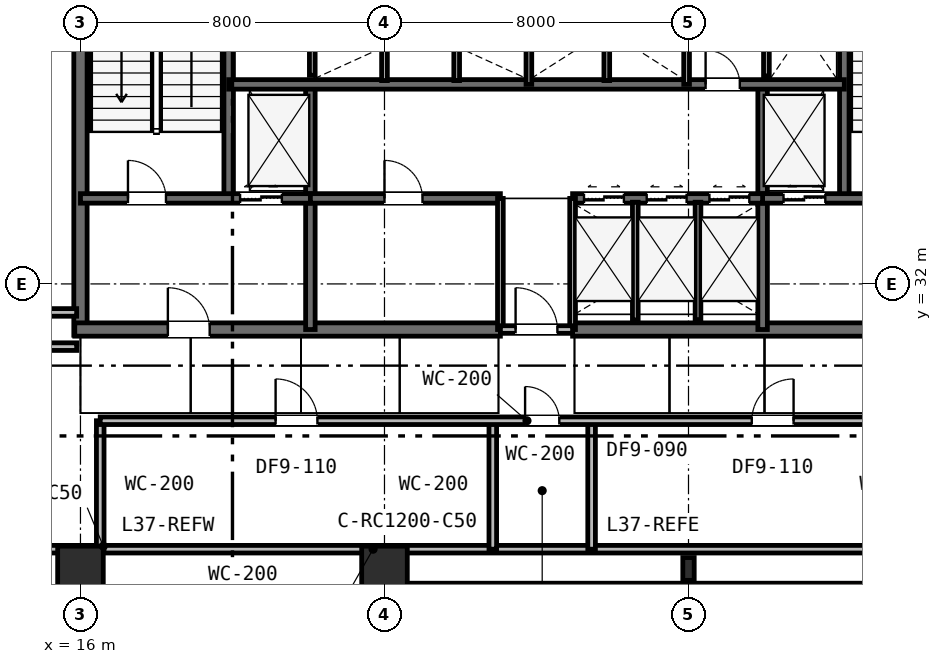
"""IFC4 building model, lengths in metres.
Left out: names, types, materials, properties, quantities, classifications, styles, units other than length and angle.
Written with IfcOpenShell. Run it as: python <this file> out.ifc"""

import sys

from ifc_helpers import new_model, si_unit, direction, frame, frame_2d, origin, origin_2d, place, context, subcontext, project, spatial, rectangle, i_section, extrude, element, fill, save


model = new_model("IFC4")
c1 = context("Model", 3, precision=1e-05, world=origin(), true_north=direction((0.0, 1.0)))
c2 = subcontext(c1, "Body", "Model", "MODEL_VIEW")
j1 = project(units=[si_unit("LENGTHUNIT", "METRE"), si_unit("PLANEANGLEUNIT", "RADIAN")], contexts=[c1])
p1 = place(None, origin())
s1 = spatial("IfcSite", under=j1, at=p1, CompositionType="ELEMENT")
p2 = place(p1, origin())
s2 = spatial("IfcBuilding", under=s1, at=p2, CompositionType="ELEMENT")
p3 = place(p2, frame((0.0, 0.0, 144.0)))
s3 = spatial("IfcBuildingStorey", under=s2, at=p3, CompositionType="ELEMENT", Elevation=144.0)
p4 = place(p3, frame((16.0, 30.65, 0.0), z_axis=(0.0, 0.0, 1.0), x_axis=(0.0, 1.0, 0.0)))
e1 = element("IfcWall", 1, at=p4, inside=s3, PredefinedType="SHEAR", context=c2, shape_type="SweptSolid", body=[
    extrude(rectangle(XDim=12.3, YDim=0.35, at=frame_2d((6.15, 0.0))), origin(), (0.0, 0.0, 1.0), 4.8),
])
p5 = place(p3, frame((15.85, 30.8, 0.0), z_axis=(0.0, 0.0, 1.0), x_axis=(1.0, 0.0, 0.0)))
e2 = element("IfcWall", 2, at=p5, inside=s3, PredefinedType="SHEAR", context=c2, shape_type="SweptSolid", body=[
    extrude(rectangle(XDim=11.2, YDim=0.35, at=frame_2d((5.6, 0.0))), origin(), (0.0, 0.0, 1.0), 4.8),
])
p6 = place(p5, frame((2.45, 0.0, 0.0)))
e3 = element("IfcOpeningElement", 3, at=p6, cuts=e2, PredefinedType="OPENING", context=c2, shape_type="SweptSolid", body=[
    extrude(rectangle(XDim=1.1, YDim=2.15, at=frame_2d((0.55, 1.075))), frame((0.0, 0.185, 0.0), z_axis=(0.0, -1.0, 0.0), x_axis=(1.0, 0.0, 0.0)), (0.0, 0.0, 1.0), 0.37),
])
p7 = place(p3, frame((28.95, 30.8, 0.0), z_axis=(0.0, 0.0, 1.0), x_axis=(1.0, 0.0, 0.0)))
e4 = element("IfcWall", 4, at=p7, inside=s3, PredefinedType="SHEAR", context=c2, shape_type="SweptSolid", body=[
    extrude(rectangle(XDim=11.2, YDim=0.35, at=frame_2d((5.6, 0.0))), origin(), (0.0, 0.0, 1.0), 4.8),
])
p8 = place(p7, frame((7.65, 0.0, 0.0)))
e5 = element("IfcOpeningElement", 5, at=p8, cuts=e4, PredefinedType="OPENING", context=c2, shape_type="SweptSolid", body=[
    extrude(rectangle(XDim=1.1, YDim=2.15, at=frame_2d((0.55, 1.075))), frame((0.0, 0.185, 0.0), z_axis=(0.0, -1.0, 0.0), x_axis=(1.0, 0.0, 0.0)), (0.0, 0.0, 1.0), 0.37),
])
for number, where, z_axis, x_axis in (
    (6, (19.9, 34.25, 0.0), (0.0, 0.0, 1.0), (0.0, 1.0, 0.0)),
    (7, (36.1, 34.25, 0.0), (0.0, 0.0, 1.0), (0.0, 1.0, 0.0)),
):
    element("IfcWall", number, at=place(p3, frame(where, z_axis=z_axis, x_axis=x_axis)), inside=s3, PredefinedType="SHEAR", context=c2, shape_type="SweptSolid", body=[
        extrude(rectangle(XDim=8.65, YDim=0.25, at=frame_2d((4.325, 0.0))), origin(), (0.0, 0.0, 1.0), 4.8),
    ])
for number, where, z_axis, x_axis in (
    (8, (22.05, 30.8, 0.0), (0.0, 0.0, 1.0), (0.0, 1.0, 0.0)),
    (9, (33.95, 30.8, 0.0), (0.0, 0.0, 1.0), (0.0, 1.0, 0.0)),
):
    element("IfcWall", number, at=place(p3, frame(where, z_axis=z_axis, x_axis=x_axis)), inside=s3, PredefinedType="SHEAR", context=c2, shape_type="SweptSolid", body=[
        extrude(rectangle(XDim=6.45, YDim=0.25, at=frame_2d((3.225, 0.0))), origin(), (0.0, 0.0, 1.0), 4.8),
    ])
p9 = place(p3, frame((16.0, 34.25, 0.0), z_axis=(0.0, 0.0, 1.0), x_axis=(1.0, 0.0, 0.0)))
e10 = element("IfcWall", 10, at=p9, inside=s3, PredefinedType="SHEAR", context=c2, shape_type="SweptSolid", body=[
    extrude(rectangle(XDim=6.05, YDim=0.25, at=frame_2d((3.025, 0.0))), origin(), (0.0, 0.0, 1.0), 4.8),
])
p10 = place(p9, frame((1.25, 0.0, 0.0)))
e11 = element("IfcOpeningElement", 11, at=p10, cuts=e10, PredefinedType="OPENING", context=c2, shape_type="SweptSolid", body=[
    extrude(rectangle(XDim=1.0, YDim=2.15, at=frame_2d((0.5, 1.075))), frame((0.0, 0.135, 0.0), z_axis=(0.0, -1.0, 0.0), x_axis=(1.0, 0.0, 0.0)), (0.0, 0.0, 1.0), 0.27),
])
p11 = place(p9, frame((4.2, 0.0, 0.0)))
e12 = element("IfcOpeningElement", 12, at=p11, cuts=e10, PredefinedType="OPENING", context=c2, shape_type="SweptSolid", body=[
    extrude(rectangle(XDim=1.1, YDim=2.15, at=frame_2d((0.55, 1.075))), frame((0.0, 0.135, 0.0), z_axis=(0.0, -1.0, 0.0), x_axis=(1.0, 0.0, 0.0)), (0.0, 0.0, 1.0), 0.27),
])
p12 = place(p3, frame((33.95, 34.25, 0.0), z_axis=(0.0, 0.0, 1.0), x_axis=(1.0, 0.0, 0.0)))
e13 = element("IfcWall", 13, at=p12, inside=s3, PredefinedType="SHEAR", context=c2, shape_type="SweptSolid", body=[
    extrude(rectangle(XDim=6.05, YDim=0.25, at=frame_2d((3.025, 0.0))), origin(), (0.0, 0.0, 1.0), 4.8),
])
p13 = place(p12, frame((3.7, 0.0, 0.0)))
e14 = element("IfcOpeningElement", 14, at=p13, cuts=e13, PredefinedType="OPENING", context=c2, shape_type="SweptSolid", body=[
    extrude(rectangle(XDim=1.0, YDim=2.15, at=frame_2d((0.5, 1.075))), frame((0.0, 0.135, 0.0), z_axis=(0.0, -1.0, 0.0), x_axis=(1.0, 0.0, 0.0)), (0.0, 0.0, 1.0), 0.27),
])
p14 = place(p12, frame((0.55, 0.0, 0.0)))
e15 = element("IfcOpeningElement", 15, at=p14, cuts=e13, PredefinedType="OPENING", context=c2, shape_type="SweptSolid", body=[
    extrude(rectangle(XDim=1.1, YDim=2.15, at=frame_2d((0.55, 1.075))), frame((0.0, 0.135, 0.0), z_axis=(0.0, -1.0, 0.0), x_axis=(1.0, 0.0, 0.0)), (0.0, 0.0, 1.0), 0.27),
])
p15 = place(p3, frame((22.05, 34.25, 0.0), z_axis=(0.0, 0.0, 1.0), x_axis=(1.0, 0.0, 0.0)))
e16 = element("IfcWall", 16, at=p15, inside=s3, PredefinedType="SHEAR", context=c2, shape_type="SweptSolid", body=[
    extrude(rectangle(XDim=5.0, YDim=0.25, at=frame_2d((2.5, 0.0))), origin(), (0.0, 0.0, 1.0), 4.8),
])
p16 = place(p15, frame((1.95, 0.0, 0.0)))
e17 = element("IfcOpeningElement", 17, at=p16, cuts=e16, PredefinedType="OPENING", context=c2, shape_type="SweptSolid", body=[
    extrude(rectangle(XDim=1.0, YDim=2.15, at=frame_2d((0.5, 1.075))), frame((0.0, 0.135, 0.0), z_axis=(0.0, -1.0, 0.0), x_axis=(1.0, 0.0, 0.0)), (0.0, 0.0, 1.0), 0.27),
])
p17 = place(p3, frame((28.95, 34.25, 0.0), z_axis=(0.0, 0.0, 1.0), x_axis=(1.0, 0.0, 0.0)))
e18 = element("IfcWall", 18, at=p17, inside=s3, PredefinedType="SHEAR", context=c2, shape_type="SweptSolid", body=[
    extrude(rectangle(XDim=5.0, YDim=0.25, at=frame_2d((2.5, 0.0))), origin(), (0.0, 0.0, 1.0), 4.8),
])
p18 = place(p17, frame((0.3, 0.0, 0.0)))
e19 = element("IfcOpeningElement", 19, at=p18, cuts=e18, PredefinedType="OPENING", context=c2, shape_type="SweptSolid", body=[
    extrude(rectangle(XDim=1.05, YDim=2.15, at=frame_2d((0.525, 1.075))), frame((0.0, 0.135, 0.0), z_axis=(0.0, -1.0, 0.0), x_axis=(1.0, 0.0, 0.0)), (0.0, 0.0, 1.0), 0.27),
])
p19 = place(p17, frame((1.95, 0.0, 0.0)))
e20 = element("IfcOpeningElement", 20, at=p19, cuts=e18, PredefinedType="OPENING", context=c2, shape_type="SweptSolid", body=[
    extrude(rectangle(XDim=1.05, YDim=2.15, at=frame_2d((0.525, 1.075))), frame((0.0, 0.135, 0.0), z_axis=(0.0, -1.0, 0.0), x_axis=(1.0, 0.0, 0.0)), (0.0, 0.0, 1.0), 0.27),
])
p20 = place(p17, frame((3.6, 0.0, 0.0)))
e21 = element("IfcOpeningElement", 21, at=p20, cuts=e18, PredefinedType="OPENING", context=c2, shape_type="SweptSolid", body=[
    extrude(rectangle(XDim=1.05, YDim=2.15, at=frame_2d((0.525, 1.075))), frame((0.0, 0.135, 0.0), z_axis=(0.0, -1.0, 0.0), x_axis=(1.0, 0.0, 0.0)), (0.0, 0.0, 1.0), 0.27),
])
p21 = place(p3, frame((19.9, 37.25, 0.0), z_axis=(0.0, 0.0, 1.0), x_axis=(1.0, 0.0, 0.0)))
e22 = element("IfcWall", 22, at=p21, inside=s3, PredefinedType="SHEAR", context=c2, shape_type="SweptSolid", body=[
    extrude(rectangle(XDim=16.2, YDim=0.25, at=frame_2d((8.1, 0.0))), origin(), (0.0, 0.0, 1.0), 4.8),
])
p22 = place(p21, frame((12.55, 0.0, 0.0)))
e23 = element("IfcOpeningElement", 23, at=p22, cuts=e22, PredefinedType="OPENING", context=c2, shape_type="SweptSolid", body=[
    extrude(rectangle(XDim=0.9, YDim=2.15, at=frame_2d((0.45, 1.075))), frame((0.0, 0.135, 0.0), z_axis=(0.0, -1.0, 0.0), x_axis=(1.0, 0.0, 0.0)), (0.0, 0.0, 1.0), 0.27),
])
for number, where, z_axis, x_axis in (
    (24, (16.0, 24.5, 0.0), (0.0, 0.0, 1.0), (1.0, 0.0, 0.0)),
    (25, (24.0, 24.5, 0.0), (0.0, 0.0, 1.0), (1.0, 0.0, 0.0)),
):
    element("IfcColumn", number, at=place(p3, frame(where, z_axis=z_axis, x_axis=x_axis)), inside=s3, PredefinedType="COLUMN", context=c2, shape_type="SweptSolid", body=[
        extrude(rectangle(XDim=1.2, YDim=1.2, at=origin_2d()), origin(), (0.0, 0.0, 1.0), 4.8),
    ])
p23 = place(p3, frame((32.0, 24.5, 0.0), z_axis=(0.0, 0.0, 1.0), x_axis=(1.0, 0.0, 0.0)))
e26 = element("IfcColumn", 26, at=p23, inside=s3, PredefinedType="COLUMN", context=c2, shape_type="SweptSolid", body=[
    extrude(i_section(OverallWidth=0.3, OverallDepth=0.6, WebThickness=0.015, FlangeThickness=0.03, FilletRadius=0.027, at=origin_2d()), origin(), (0.0, 0.0, 1.0), 4.8),
])
p24 = place(p3, frame((24.6, 24.0, 0.0), z_axis=(0.0, 0.0, 1.0), x_axis=(1.0, 0.0, 0.0)))
e27 = element("IfcWall", 27, at=p24, inside=s3, PredefinedType="STANDARD", context=c2, shape_type="SweptSolid", body=[
    extrude(rectangle(XDim=14.3, YDim=0.25, at=frame_2d((7.15, 0.0))), origin(), (0.0, 0.0, 1.0), 1.15),
])
for number, where, z_axis, x_axis in (
    (28, (27.05, 30.8, 0.0), (0.0, 0.0, 1.0), (0.0, 1.0, 0.0)),
    (29, (28.95, 30.8, 0.0), (0.0, 0.0, 1.0), (0.0, 1.0, 0.0)),
):
    element("IfcWall", number, at=place(p3, frame(where, z_axis=z_axis, x_axis=x_axis)), inside=s3, PredefinedType="PLUMBINGWALL", context=c2, shape_type="SweptSolid", body=[
        extrude(rectangle(XDim=3.45, YDim=0.15, at=frame_2d((1.725, 0.0))), origin(), (0.0, 0.0, 1.0), 4.02),
    ])
p25 = place(p3, frame((27.05, 30.8, 0.0), z_axis=(0.0, 0.0, 1.0), x_axis=(1.0, 0.0, 0.0)))
e30 = element("IfcWall", 30, at=p25, inside=s3, PredefinedType="PARTITIONING", context=c2, shape_type="SweptSolid", body=[
    extrude(rectangle(XDim=1.9, YDim=0.2, at=frame_2d((0.95, 0.0))), origin(), (0.0, 0.0, 1.0), 4.02),
])
p26 = place(p25, frame((0.4, 0.0, 0.0)))
e31 = element("IfcOpeningElement", 31, at=p26, cuts=e30, PredefinedType="OPENING", context=c2, shape_type="SweptSolid", body=[
    extrude(rectangle(XDim=1.1, YDim=2.15, at=frame_2d((0.55, 1.075))), frame((0.0, 0.11, 0.0), z_axis=(0.0, -1.0, 0.0), x_axis=(1.0, 0.0, 0.0)), (0.0, 0.0, 1.0), 0.22),
])
for number, where, z_axis, x_axis in (
    (32, (30.6, 31.05, 0.0), (0.0, 0.0, 1.0), (0.0, 1.0, 0.0)),
    (33, (32.25, 31.05, 0.0), (0.0, 0.0, 1.0), (0.0, 1.0, 0.0)),
):
    element("IfcWall", number, at=place(p3, frame(where, z_axis=z_axis, x_axis=x_axis)), inside=s3, PredefinedType="PLUMBINGWALL", context=c2, shape_type="SweptSolid", body=[
        extrude(rectangle(XDim=3.1, YDim=0.15, at=frame_2d((1.55, 0.0))), origin(), (0.0, 0.0, 1.0), 4.02),
    ])
p27 = place(p3, frame((22.1, 37.49, 0.0), z_axis=(0.0, 0.0, 1.0), x_axis=(0.0, 1.0, 0.0)))
e34 = element("IfcWall", 34, at=p27, inside=s3, PredefinedType="PLUMBINGWALL", context=c2, shape_type="SweptSolid", body=[
    extrude(rectangle(XDim=2.56, YDim=0.15, at=frame_2d((1.28, 0.0))), origin(), (0.0, 0.0, 1.0), 4.02),
])
p28 = place(p3, frame((27.8, 37.25, 0.0), z_axis=(0.0, 0.0, 1.0), x_axis=(0.0, 1.0, 0.0)))
e35 = element("IfcWall", 35, at=p28, inside=s3, PredefinedType="PLUMBINGWALL", context=c2, shape_type="SweptSolid", body=[
    extrude(rectangle(XDim=2.8, YDim=0.15, at=frame_2d((1.4, 0.0))), origin(), (0.0, 0.0, 1.0), 4.02),
])
for number, where, z_axis, x_axis in (
    (36, (24.0, 37.35, 0.0), (0.0, 0.0, 1.0), (0.0, 1.0, 0.0)),
    (37, (25.9, 37.35, 0.0), (0.0, 0.0, 1.0), (0.0, 1.0, 0.0)),
):
    element("IfcWall", number, at=place(p3, frame(where, z_axis=z_axis, x_axis=x_axis)), inside=s3, PredefinedType="PLUMBINGWALL", context=c2, shape_type="SweptSolid", body=[
        extrude(rectangle(XDim=2.6, YDim=0.15, at=frame_2d((1.3, 0.0))), origin(), (0.0, 0.0, 1.0), 4.02),
    ])
p29 = place(p3, frame((31.95, 37.25, 0.0), z_axis=(0.0, 0.0, 1.0), x_axis=(0.0, 1.0, 0.0)))
e38 = element("IfcWall", 38, at=p29, inside=s3, PredefinedType="PLUMBINGWALL", context=c2, shape_type="SweptSolid", body=[
    extrude(rectangle(XDim=2.8, YDim=0.15, at=frame_2d((1.4, 0.0))), origin(), (0.0, 0.0, 1.0), 4.02),
])
p30 = place(p3, frame((29.85, 37.35, 0.0), z_axis=(0.0, 0.0, 1.0), x_axis=(0.0, 1.0, 0.0)))
e39 = element("IfcWall", 39, at=p30, inside=s3, PredefinedType="PLUMBINGWALL", context=c2, shape_type="SweptSolid", body=[
    extrude(rectangle(XDim=2.6, YDim=0.15, at=frame_2d((1.3, 0.0))), origin(), (0.0, 0.0, 1.0), 4.02),
])
p31 = place(p3, frame((34.05, 37.473, 0.0), z_axis=(0.0, 0.0, 1.0), x_axis=(0.0, 1.0, 0.0)))
e40 = element("IfcWall", 40, at=p31, inside=s3, PredefinedType="PLUMBINGWALL", context=c2, shape_type="SweptSolid", body=[
    extrude(rectangle(XDim=2.577, YDim=0.15, at=frame_2d((1.288, 0.0))), origin(), (0.0, 0.0, 1.0), 4.02),
])
p32 = place(p3, frame((8.4, 25.02, 0.0), z_axis=(0.0, 0.0, 1.0), x_axis=(1.0, 0.0, 0.0)))
e41 = element("IfcWall", 41, at=p32, inside=s3, PredefinedType="PARTITIONING", context=c2, shape_type="SweptSolid", body=[
    extrude(rectangle(XDim=30.6, YDim=0.2, at=frame_2d((15.3, 0.0))), origin(), (0.0, 0.0, 1.0), 4.02),
])
p33 = place(p3, frame((16.52, 25.02, 0.0), z_axis=(0.0, 0.0, 1.0), x_axis=(0.0, 1.0, 0.0)))
e42 = element("IfcWall", 42, at=p33, inside=s3, PredefinedType="PARTITIONING", context=c2, shape_type="SweptSolid", body=[
    extrude(rectangle(XDim=3.38, YDim=0.2, at=frame_2d((1.69, 0.0))), origin(), (0.0, 0.0, 1.0), 4.02),
])
for number, where, z_axis, x_axis in (
    (43, (0.1, 30.35, 0.0), (0.0, 0.0, 1.0), (1.0, 0.0, 0.0)),
    (44, (0.1, 31.25, 0.0), (0.0, 0.0, 1.0), (1.0, 0.0, 0.0)),
):
    element("IfcWall", number, at=place(p3, frame(where, z_axis=z_axis, x_axis=x_axis)), inside=s3, PredefinedType="PARTITIONING", context=c2, shape_type="SweptSolid", body=[
        extrude(rectangle(XDim=15.8, YDim=0.2, at=frame_2d((7.9, 0.0))), origin(), (0.0, 0.0, 1.0), 4.02),
    ])
for number, where, z_axis, x_axis in (
    (45, (26.85, 25.02, 0.0), (0.0, 0.0, 1.0), (0.0, 1.0, 0.0)),
    (46, (29.45, 25.02, 0.0), (0.0, 0.0, 1.0), (0.0, 1.0, 0.0)),
):
    element("IfcWall", number, at=place(p3, frame(where, z_axis=z_axis, x_axis=x_axis)), inside=s3, PredefinedType="PARTITIONING", context=c2, shape_type="SweptSolid", body=[
        extrude(rectangle(XDim=3.38, YDim=0.2, at=frame_2d((1.69, 0.0))), origin(), (0.0, 0.0, 1.0), 4.02),
    ])
p34 = place(p3, frame((16.52, 28.4, 0.0), z_axis=(0.0, 0.0, 1.0), x_axis=(1.0, 0.0, 0.0)))
e47 = element("IfcWall", 47, at=p34, inside=s3, PredefinedType="PARTITIONING", context=c2, shape_type="SweptSolid", body=[
    extrude(rectangle(XDim=22.46, YDim=0.2, at=frame_2d((11.23, 0.0))), origin(), (0.0, 0.0, 1.0), 4.02),
])
p35 = place(p34, frame((4.615, 0.0, 0.0)))
e48 = element("IfcOpeningElement", 48, at=p35, cuts=e47, PredefinedType="OPENING", context=c2, shape_type="SweptSolid", body=[
    extrude(rectangle(XDim=1.1, YDim=2.15, at=frame_2d((0.55, 1.075))), frame((0.0, 0.11, 0.0), z_axis=(0.0, -1.0, 0.0), x_axis=(1.0, 0.0, 0.0)), (0.0, 0.0, 1.0), 0.22),
])
p36 = place(p34, frame((11.18, 0.0, 0.0)))
e49 = element("IfcOpeningElement", 49, at=p36, cuts=e47, PredefinedType="OPENING", context=c2, shape_type="SweptSolid", body=[
    extrude(rectangle(XDim=0.9, YDim=2.15, at=frame_2d((0.45, 1.075))), frame((0.0, 0.11, 0.0), z_axis=(0.0, -1.0, 0.0), x_axis=(1.0, 0.0, 0.0)), (0.0, 0.0, 1.0), 0.22),
])
p37 = place(p34, frame((17.145, 0.0, 0.0)))
e50 = element("IfcOpeningElement", 50, at=p37, cuts=e47, PredefinedType="OPENING", context=c2, shape_type="SweptSolid", body=[
    extrude(rectangle(XDim=1.1, YDim=2.15, at=frame_2d((0.55, 1.075))), frame((0.0, 0.11, 0.0), z_axis=(0.0, -1.0, 0.0), x_axis=(1.0, 0.0, 0.0)), (0.0, 0.0, 1.0), 0.22),
])
p38 = place(p26, origin())
e51 = element("IfcDoor", 51, at=p38, inside=s3, OperationType="SINGLE_SWING_LEFT", PredefinedType="DOOR", context=c2, shape_type="SweptSolid", body=[
    extrude(rectangle(XDim=1.1, YDim=2.15, at=frame_2d((0.55, 1.075))), frame((0.0, 0.025, 0.0), z_axis=(0.0, -1.0, 0.0), x_axis=(1.0, 0.0, 0.0)), (0.0, 0.0, 1.0), 0.05),
])
fill(e31, e51)
p39 = place(p10, origin())
e52 = element("IfcDoor", 52, at=p39, inside=s3, OperationType="SINGLE_SWING_LEFT", PredefinedType="DOOR", context=c2, shape_type="SweptSolid", body=[
    extrude(rectangle(XDim=1.0, YDim=2.15, at=frame_2d((0.5, 1.075))), frame((0.0, 0.025, 0.0), z_axis=(0.0, -1.0, 0.0), x_axis=(1.0, 0.0, 0.0)), (0.0, 0.0, 1.0), 0.05),
])
fill(e11, e52)
p40 = place(p6, origin())
e53 = element("IfcDoor", 53, at=p40, inside=s3, OperationType="SINGLE_SWING_LEFT", PredefinedType="DOOR", context=c2, shape_type="SweptSolid", body=[
    extrude(rectangle(XDim=1.1, YDim=2.15, at=frame_2d((0.55, 1.075))), frame((0.0, 0.025, 0.0), z_axis=(0.0, -1.0, 0.0), x_axis=(1.0, 0.0, 0.0)), (0.0, 0.0, 1.0), 0.05),
])
fill(e3, e53)
p41 = place(p16, origin())
e54 = element("IfcDoor", 54, at=p41, inside=s3, OperationType="SINGLE_SWING_LEFT", PredefinedType="DOOR", context=c2, shape_type="SweptSolid", body=[
    extrude(rectangle(XDim=1.0, YDim=2.15, at=frame_2d((0.5, 1.075))), frame((0.0, 0.025, 0.0), z_axis=(0.0, -1.0, 0.0), x_axis=(1.0, 0.0, 0.0)), (0.0, 0.0, 1.0), 0.05),
])
fill(e17, e54)
p42 = place(p22, origin())
e55 = element("IfcDoor", 55, at=p42, inside=s3, OperationType="SINGLE_SWING_LEFT", PredefinedType="DOOR", context=c2, shape_type="SweptSolid", body=[
    extrude(rectangle(XDim=0.9, YDim=2.15, at=frame_2d((0.45, 1.075))), frame((0.0, 0.025, 0.0), z_axis=(0.0, -1.0, 0.0), x_axis=(1.0, 0.0, 0.0)), (0.0, 0.0, 1.0), 0.05),
])
fill(e23, e55)
p43 = place(p35, origin())
e56 = element("IfcDoor", 56, at=p43, inside=s3, OperationType="SINGLE_SWING_LEFT", PredefinedType="DOOR", context=c2, shape_type="SweptSolid", body=[
    extrude(rectangle(XDim=1.1, YDim=2.15, at=frame_2d((0.55, 1.075))), frame((0.0, 0.025, 0.0), z_axis=(0.0, -1.0, 0.0), x_axis=(1.0, 0.0, 0.0)), (0.0, 0.0, 1.0), 0.05),
])
fill(e48, e56)
p44 = place(p36, origin())
e57 = element("IfcDoor", 57, at=p44, inside=s3, OperationType="SINGLE_SWING_LEFT", PredefinedType="DOOR", context=c2, shape_type="SweptSolid", body=[
    extrude(rectangle(XDim=0.9, YDim=2.15, at=frame_2d((0.45, 1.075))), frame((0.0, 0.025, 0.0), z_axis=(0.0, -1.0, 0.0), x_axis=(1.0, 0.0, 0.0)), (0.0, 0.0, 1.0), 0.05),
])
fill(e49, e57)
p45 = place(p37, origin())
e58 = element("IfcDoor", 58, at=p45, inside=s3, OperationType="SINGLE_SWING_RIGHT", PredefinedType="DOOR", context=c2, shape_type="SweptSolid", body=[
    extrude(rectangle(XDim=1.1, YDim=2.15, at=frame_2d((0.55, 1.075))), frame((0.0, 0.025, 0.0), z_axis=(0.0, -1.0, 0.0), x_axis=(1.0, 0.0, 0.0)), (0.0, 0.0, 1.0), 0.05),
])
fill(e50, e58)
p46 = place(p11, origin())
e59 = element("IfcDoor", 59, at=p46, inside=s3, OperationType="DOUBLE_DOOR_SLIDING", PredefinedType="DOOR", context=c2, shape_type="SweptSolid", body=[
    extrude(rectangle(XDim=1.1, YDim=2.15, at=frame_2d((0.55, 1.075))), frame((0.0, 0.025, 0.0), z_axis=(0.0, -1.0, 0.0), x_axis=(1.0, 0.0, 0.0)), (0.0, 0.0, 1.0), 0.05),
])
fill(e12, e59)
p47 = place(p14, origin())
e60 = element("IfcDoor", 60, at=p47, inside=s3, OperationType="DOUBLE_DOOR_SLIDING", PredefinedType="DOOR", context=c2, shape_type="SweptSolid", body=[
    extrude(rectangle(XDim=1.1, YDim=2.15, at=frame_2d((0.55, 1.075))), frame((0.0, 0.025, 0.0), z_axis=(0.0, -1.0, 0.0), x_axis=(1.0, 0.0, 0.0)), (0.0, 0.0, 1.0), 0.05),
])
fill(e15, e60)
p48 = place(p18, origin())
e61 = element("IfcDoor", 61, at=p48, inside=s3, OperationType="DOUBLE_DOOR_SLIDING", PredefinedType="DOOR", context=c2, shape_type="SweptSolid", body=[
    extrude(rectangle(XDim=1.05, YDim=2.15, at=frame_2d((0.525, 1.075))), frame((0.0, 0.025, 0.0), z_axis=(0.0, -1.0, 0.0), x_axis=(1.0, 0.0, 0.0)), (0.0, 0.0, 1.0), 0.05),
])
fill(e19, e61)
p49 = place(p19, origin())
e62 = element("IfcDoor", 62, at=p49, inside=s3, OperationType="DOUBLE_DOOR_SLIDING", PredefinedType="DOOR", context=c2, shape_type="SweptSolid", body=[
    extrude(rectangle(XDim=1.05, YDim=2.15, at=frame_2d((0.525, 1.075))), frame((0.0, 0.025, 0.0), z_axis=(0.0, -1.0, 0.0), x_axis=(1.0, 0.0, 0.0)), (0.0, 0.0, 1.0), 0.05),
])
fill(e20, e62)
p50 = place(p20, origin())
e63 = element("IfcDoor", 63, at=p50, inside=s3, OperationType="DOUBLE_DOOR_SLIDING", PredefinedType="DOOR", context=c2, shape_type="SweptSolid", body=[
    extrude(rectangle(XDim=1.05, YDim=2.15, at=frame_2d((0.525, 1.075))), frame((0.0, 0.025, 0.0), z_axis=(0.0, -1.0, 0.0), x_axis=(1.0, 0.0, 0.0)), (0.0, 0.0, 1.0), 0.05),
])
fill(e21, e63)
save(model, sys.argv[1])
